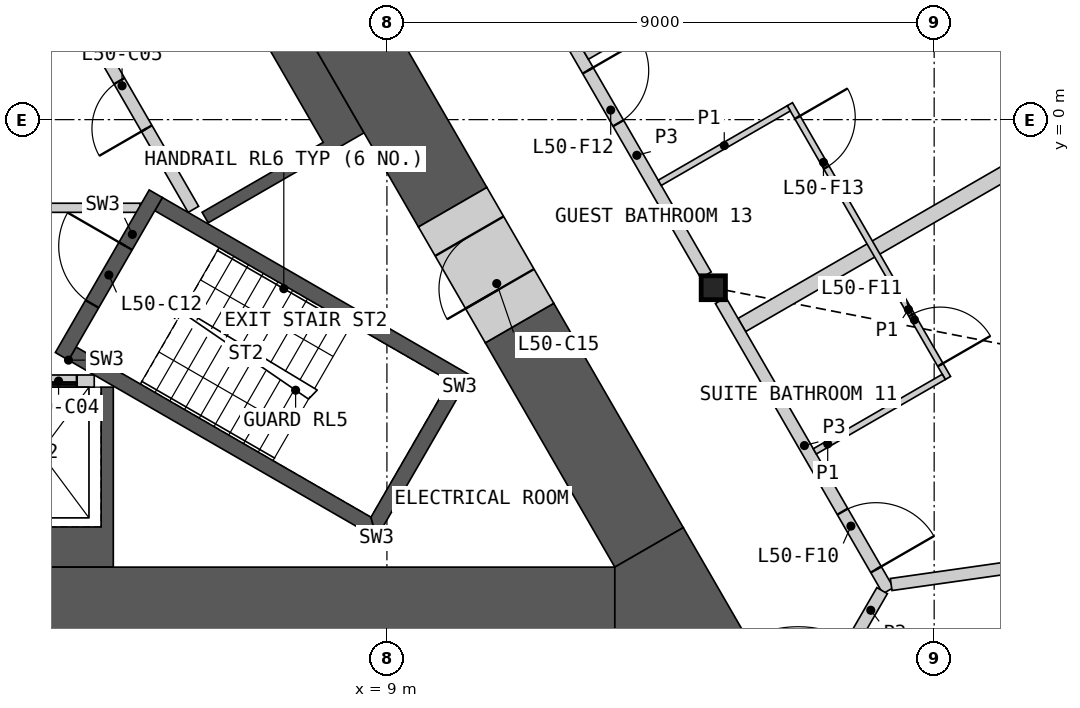
"""IFC4 building model, lengths in metres.
Left out: names, types, materials, properties, quantities, classifications, styles, units other than length and angle.
Written with IfcOpenShell. Run it as: python <this file> out.ifc"""

import sys

from ifc_helpers import new_model, si_unit, direction, frame, frame_2d, origin, origin_2d, place, context, subcontext, project, spatial, polyline, rectangle, i_section, outline, extrude, element, fill, save


model = new_model("IFC4")
c1 = context("Model", 3, precision=1e-05, world=origin(), true_north=direction((0.0, 1.0)))
c2 = subcontext(c1, "Body", "Model", "MODEL_VIEW")
j1 = project(units=[si_unit("LENGTHUNIT", "METRE"), si_unit("PLANEANGLEUNIT", "RADIAN")], contexts=[c1])
p1 = place(None, origin())
s1 = spatial("IfcSite", under=j1, at=p1, CompositionType="ELEMENT")
p2 = place(p1, origin())
s2 = spatial("IfcBuilding", under=s1, at=p2, CompositionType="ELEMENT")
p3 = place(p2, frame((0.0, 0.0, 231.0)))
s3 = spatial("IfcBuildingStorey", under=s2, at=p3, CompositionType="ELEMENT", Elevation=231.0)
p4 = place(p3, frame((14.368, -2.765, 0.0), z_axis=(0.0, 0.0, 1.0), x_axis=(1.0, 0.0, 0.0)))
e1 = element("IfcColumn", 1, at=p4, inside=s3, PredefinedType="COLUMN", context=c2, shape_type="SweptSolid", body=[
    extrude(i_section(OverallWidth=0.399, OverallDepth=0.393, WebThickness=0.023, FlangeThickness=0.037, at=origin_2d()), origin(), (0.0, 0.0, 1.0), 3.6),
])
p5 = place(p3, origin())
e2 = element("IfcWall", 2, at=p5, inside=s3, PredefinedType="SHEAR", context=c2, shape_type="SweptSolid", body=[
    extrude(outline(polyline([(2.1, -7.36), (2.1, -4.4), (2.3, -4.4), (2.3, -6.7), (4.3, -6.7), (4.3, -4.4), (4.5, -4.4), (4.5, -7.36), (2.1, -7.36)])), origin(), (0.0, 0.0, 1.0), 3.25),
])
p6 = place(p3, frame((-4.187, -4.3, 0.0), z_axis=(0.0, 0.0, 1.0), x_axis=(1.0, 0.0, 0.0)))
e3 = element("IfcWall", 3, at=p6, inside=s3, PredefinedType="SOLIDWALL", context=c2, shape_type="SweptSolid", body=[
    extrude(rectangle(XDim=8.373, YDim=0.2, at=frame_2d((4.187, 0.0))), origin(), (0.0, 0.0, 1.0), 3.25),
])
p7 = place(p6, frame((0.287, 0.0, 0.0)))
e4 = element("IfcOpeningElement", 4, at=p7, cuts=e3, PredefinedType="OPENING", context=c2, shape_type="SweptSolid", body=[
    extrude(rectangle(XDim=1.2, YDim=2.1, at=frame_2d((0.6, 1.05))), frame((0.0, 0.11, 0.0), z_axis=(0.0, -1.0, 0.0), x_axis=(1.0, 0.0, 0.0)), (0.0, 0.0, 1.0), 0.22),
])
p8 = place(p6, frame((2.387, 0.0, 0.0)))
e5 = element("IfcOpeningElement", 5, at=p8, cuts=e3, PredefinedType="OPENING", context=c2, shape_type="SweptSolid", body=[
    extrude(rectangle(XDim=1.4, YDim=2.1, at=frame_2d((0.7, 1.05))), frame((0.0, 0.11, 0.0), z_axis=(0.0, -1.0, 0.0), x_axis=(1.0, 0.0, 0.0)), (0.0, 0.0, 1.0), 0.22),
])
p9 = place(p6, frame((4.837, 0.0, 0.0)))
e6 = element("IfcOpeningElement", 6, at=p9, cuts=e3, PredefinedType="OPENING", context=c2, shape_type="SweptSolid", body=[
    extrude(rectangle(XDim=0.9, YDim=2.1, at=frame_2d((0.45, 1.05))), frame((0.0, 0.11, 0.0), z_axis=(0.0, -1.0, 0.0), x_axis=(1.0, 0.0, 0.0)), (0.0, 0.0, 1.0), 0.22),
])
p10 = place(p6, frame((6.887, 0.0, 0.0)))
e7 = element("IfcOpeningElement", 7, at=p10, cuts=e3, PredefinedType="OPENING", context=c2, shape_type="SweptSolid", body=[
    extrude(rectangle(XDim=1.2, YDim=2.1, at=frame_2d((0.6, 1.05))), frame((0.0, 0.11, 0.0), z_axis=(0.0, -1.0, 0.0), x_axis=(1.0, 0.0, 0.0)), (0.0, 0.0, 1.0), 0.22),
])
p11 = place(p3, origin())
e8 = element("IfcWall", 8, at=p11, inside=s3, PredefinedType="SHEAR", context=c2, shape_type="SweptSolid", body=[
    extrude(outline(polyline([(6.324, 3.767), (8.624, -0.217), (8.231, -0.444), (6.061, -1.697), (5.96, -1.524), (7.952, -0.374), (5.852, 3.263), (3.861, 2.113), (3.76, 2.287), (5.931, 3.54), (6.324, 3.767)])), origin(), (0.0, 0.0, 1.0), 3.25),
])
p12 = place(p3, frame((5.817, -1.476, 0.0), z_axis=(0.0, 0.0, 1.0), x_axis=(-0.500002616675, 0.866023893041, 0.0)))
e9 = element("IfcWall", 9, at=p12, inside=s3, PredefinedType="SOLIDWALL", context=c2, shape_type="SweptSolid", body=[
    extrude(rectangle(XDim=8.373, YDim=0.2, at=frame_2d((4.187, 0.0))), origin(), (0.0, 0.0, 1.0), 3.25),
])
p13 = place(p12, frame((1.537, 0.0, 0.0)))
e10 = element("IfcOpeningElement", 10, at=p13, cuts=e9, PredefinedType="OPENING", context=c2, shape_type="SweptSolid", body=[
    extrude(rectangle(XDim=0.9, YDim=2.1, at=frame_2d((0.45, 1.05))), frame((0.0, 0.11, 0.0), z_axis=(0.0, -1.0, 0.0), x_axis=(1.0, 0.0, 0.0)), (0.0, 0.0, 1.0), 0.22),
])
p14 = place(p12, frame((4.837, 0.0, 0.0)))
e11 = element("IfcOpeningElement", 11, at=p14, cuts=e9, PredefinedType="OPENING", context=c2, shape_type="SweptSolid", body=[
    extrude(rectangle(XDim=0.9, YDim=2.1, at=frame_2d((0.45, 1.05))), frame((0.0, 0.11, 0.0), z_axis=(0.0, -1.0, 0.0), x_axis=(1.0, 0.0, 0.0)), (0.0, 0.0, 1.0), 0.22),
])
p15 = place(p12, frame((6.937, 0.0, 0.0)))
e12 = element("IfcOpeningElement", 12, at=p15, cuts=e9, PredefinedType="OPENING", context=c2, shape_type="SweptSolid", body=[
    extrude(rectangle(XDim=1.1, YDim=2.1, at=frame_2d((0.55, 1.05))), frame((0.0, 0.11, 0.0), z_axis=(0.0, -1.0, 0.0), x_axis=(1.0, 0.0, 0.0)), (0.0, 0.0, 1.0), 0.22),
])
p16 = place(p3, frame((-4.941, -1.45, 0.0), z_axis=(0.0, 0.0, 1.0), x_axis=(1.0, 0.0, 0.0)))
e13 = element("IfcWall", 13, at=p16, inside=s3, PredefinedType="PARTITIONING", context=c2, shape_type="SweptSolid", body=[
    extrude(rectangle(XDim=9.882, YDim=0.15, at=frame_2d((4.941, 0.0))), origin(), (0.0, 0.0, 1.0), 3.25),
])
p17 = place(p16, frame((4.391, 0.0, 0.0)))
e14 = element("IfcOpeningElement", 14, at=p17, cuts=e13, PredefinedType="OPENING", context=c2, shape_type="SweptSolid", body=[
    extrude(rectangle(XDim=1.1, YDim=2.1, at=frame_2d((0.55, 1.05))), frame((0.0, 0.085, 0.0), z_axis=(0.0, -1.0, 0.0), x_axis=(1.0, 0.0, 0.0)), (0.0, 0.0, 1.0), 0.17),
])
p18 = place(p3, origin())
e15 = element("IfcWall", 15, at=p18, inside=s3, PredefinedType="SHEAR", context=c2, shape_type="SweptSolid", body=[
    extrude(outline(polyline([(3.763, -3.956), (8.83, -6.881), (8.738, -6.539), (3.888, -3.739), (3.763, -3.956)])), origin(), (0.0, 0.0, 1.0), 3.25),
])
p19 = place(p3, origin())
e16 = element("IfcWall", 16, at=p19, inside=s3, PredefinedType="SHEAR", context=c2, shape_type="SweptSolid", body=[
    extrude(outline(polyline([(8.83, -6.881), (10.374, -4.206), (10.032, -4.298), (8.738, -6.539), (8.83, -6.881)])), origin(), (0.0, 0.0, 1.0), 3.25),
])
p20 = place(p3, origin())
e17 = element("IfcWall", 17, at=p20, inside=s3, PredefinedType="SHEAR", context=c2, shape_type="SweptSolid", body=[
    extrude(outline(polyline([(10.032, -4.298), (10.374, -4.206), (5.307, -1.281), (5.182, -1.498), (10.032, -4.298)])), origin(), (0.0, 0.0, 1.0), 3.25),
])
p21 = place(p3, frame((3.655, -3.893, 0.0), z_axis=(0.0, 0.0, 1.0), x_axis=(0.499982516597, 0.866035497597, 0.0)))
e18 = element("IfcWall", 18, at=p21, inside=s3, PredefinedType="SHEAR", context=c2, shape_type="SweptSolid", body=[
    extrude(rectangle(XDim=3.088, YDim=0.25, at=frame_2d((1.544, 0.0))), origin(), (0.0, 0.0, 1.0), 3.25),
])
p22 = place(p21, frame((0.994, 0.0, 0.0)))
e19 = element("IfcOpeningElement", 19, at=p22, cuts=e18, PredefinedType="OPENING", context=c2, shape_type="SweptSolid", body=[
    extrude(rectangle(XDim=1.1, YDim=2.1, at=frame_2d((0.55, 1.05))), frame((0.0, 0.135, 0.0), z_axis=(0.0, -1.0, 0.0), x_axis=(1.0, 0.0, 0.0)), (0.0, 0.0, 1.0), 0.27),
])
p23 = place(p3, frame((-12.748, -8.01, 0.0), z_axis=(0.0, 0.0, 1.0), x_axis=(1.0, 0.0, 0.0)))
e20 = element("IfcWall", 20, at=p23, inside=s3, PredefinedType="SHEAR", context=c2, shape_type="SweptSolid", body=[
    extrude(rectangle(XDim=25.497, YDim=1.3, at=frame_2d((12.748, 0.0))), origin(), (0.0, 0.0, 1.0), 3.25),
])
p24 = place(p3, frame((10.081, -1.441, 0.0), z_axis=(0.0, 0.0, 1.0), x_axis=(-0.500012180433, 0.866018371294, 0.0)))
e21 = element("IfcWall", 21, at=p24, inside=s3, PredefinedType="SHEAR", context=c2, shape_type="SweptSolid", body=[
    extrude(rectangle(XDim=15.05, YDim=1.3, at=frame_2d((7.525, 0.0))), origin(), (0.0, 0.0, 1.0), 3.25),
])
p25 = place(p3, frame((13.311, -7.035, 0.0), z_axis=(0.0, 0.0, 1.0), x_axis=(-0.500003555838, 0.866023350811, 0.0)))
e22 = element("IfcWall", 22, at=p25, inside=s3, PredefinedType="SHEAR", context=c2, shape_type="SweptSolid", body=[
    extrude(rectangle(XDim=4.26, YDim=1.3, at=frame_2d((2.13, 0.0))), origin(), (0.0, 0.0, 1.0), 3.25),
])
p26 = place(p3, origin())
e23 = element("IfcWall", 23, at=p26, inside=s3, PredefinedType="SHEAR", context=c2, shape_type="SweptSolid", body=[
    extrude(outline(polyline([(12.748, -8.66), (12.748, -7.36), (13.874, -6.71), (15.0, -8.66), (12.748, -8.66)])), origin(), (0.0, 0.0, 1.0), 3.25),
])
p27 = place(p3, frame((11.181, -3.346, 0.0), z_axis=(0.0, 0.0, 1.0), x_axis=(-0.499946605688, 0.86605622881, 0.0)))
e24 = element("IfcWall", 24, at=p27, inside=s3, PredefinedType="SHEAR", context=c2, shape_type="SweptSolid", body=[
    extrude(rectangle(XDim=2.2, YDim=1.3, at=frame_2d((1.1, 0.0))), origin(), (0.0, 0.0, 1.0), 3.25),
])
p28 = place(p27, frame((0.65, 0.0, 0.0)))
e25 = element("IfcOpeningElement", 25, at=p28, cuts=e24, PredefinedType="OPENING", context=c2, shape_type="SweptSolid", body=[
    extrude(rectangle(XDim=1.0, YDim=2.1, at=frame_2d((0.5, 1.05))), frame((0.0, 0.66, 0.0), z_axis=(0.0, -1.0, 0.0), x_axis=(1.0, 0.0, 0.0)), (0.0, 0.0, 1.0), 1.32),
])
p29 = place(p3, frame((14.837, -3.378, 0.0), z_axis=(0.0, 0.0, 1.0), x_axis=(0.866021706022, 0.500006404657, 0.0)))
e26 = element("IfcWall", 26, at=p29, inside=s3, PredefinedType="PARTITIONING", context=c2, shape_type="SweptSolid", body=[
    extrude(rectangle(XDim=12.33, YDim=0.25, at=frame_2d((6.165, 0.0))), origin(), (0.0, 0.0, 1.0), 2.404),
])
p30 = place(p3, frame((9.699, 5.321, 0.0), z_axis=(0.0, 0.0, 1.0), x_axis=(0.49998193945, -0.866035830797, 0.0)))
e27 = element("IfcWall", 27, at=p30, inside=s3, PredefinedType="PARTITIONING", context=c2, shape_type="SweptSolid", body=[
    extrude(rectangle(XDim=9.094, YDim=0.2, at=frame_2d((4.547, 0.0))), origin(), (0.0, 0.0, 1.0), 3.25),
])
p31 = place(p30, frame((5.212, 0.0, 0.0)))
e28 = element("IfcOpeningElement", 28, at=p31, cuts=e27, PredefinedType="OPENING", context=c2, shape_type="SweptSolid", body=[
    extrude(rectangle(XDim=1.0, YDim=2.1, at=frame_2d((0.5, 1.05))), frame((0.0, 0.11, 0.0), z_axis=(0.0, -1.0, 0.0), x_axis=(1.0, 0.0, 0.0)), (0.0, 0.0, 1.0), 0.22),
])
p32 = place(p30, frame((1.162, 0.0, 0.0)))
e29 = element("IfcOpeningElement", 29, at=p32, cuts=e27, PredefinedType="OPENING", context=c2, shape_type="SweptSolid", body=[
    extrude(rectangle(XDim=1.1, YDim=2.1, at=frame_2d((0.55, 1.05))), frame((0.0, 0.11, 0.0), z_axis=(0.0, -1.0, 0.0), x_axis=(1.0, 0.0, 0.0)), (0.0, 0.0, 1.0), 0.22),
])
p33 = place(p3, frame((12.251, 1.101, 0.0), z_axis=(0.0, 0.0, 1.0), x_axis=(0.866020808234, 0.500007959642, 0.0)))
e30 = element("IfcWall", 30, at=p33, inside=s3, PredefinedType="PARTITIONING", context=c2, shape_type="SweptSolid", body=[
    extrude(rectangle(XDim=7.649, YDim=0.25, at=frame_2d((3.824, 0.0))), origin(), (0.0, 0.0, 1.0), 2.404),
])
p34 = place(p3, frame((14.489, -2.975, 0.0), z_axis=(0.0, 0.0, 1.0), x_axis=(0.500017753321, -0.866015153657, 0.0)))
e31 = element("IfcWall", 31, at=p34, inside=s3, PredefinedType="PARTITIONING", context=c2, shape_type="SweptSolid", body=[
    extrude(rectangle(XDim=5.51, YDim=0.2, at=frame_2d((2.755, 0.0))), origin(), (0.0, 0.0, 1.0), 3.25),
])
p35 = place(p34, frame((4.01, 0.0, 0.0)))
e32 = element("IfcOpeningElement", 32, at=p35, cuts=e31, PredefinedType="OPENING", context=c2, shape_type="SweptSolid", body=[
    extrude(rectangle(XDim=1.1, YDim=2.1, at=frame_2d((0.55, 1.05))), frame((0.0, 0.11, 0.0), z_axis=(0.0, -1.0, 0.0), x_axis=(1.0, 0.0, 0.0)), (0.0, 0.0, 1.0), 0.22),
])
p36 = place(p3, frame((15.281, -10.974, 0.0), z_axis=(0.0, 0.0, 1.0), x_axis=(0.499958791762, 0.866049194065, 0.0)))
e33 = element("IfcWall", 33, at=p36, inside=s3, PredefinedType="PARTITIONING", context=c2, shape_type="SweptSolid", body=[
    extrude(rectangle(XDim=3.726, YDim=0.2, at=frame_2d((1.863, 0.0))), origin(), (0.0, 0.0, 1.0), 3.25),
])
p37 = place(p36, frame((0.963, 0.0, 0.0)))
e34 = element("IfcOpeningElement", 34, at=p37, cuts=e33, PredefinedType="OPENING", context=c2, shape_type="SweptSolid", body=[
    extrude(rectangle(XDim=1.8, YDim=2.1, at=frame_2d((0.9, 1.05))), frame((0.0, 0.11, 0.0), z_axis=(0.0, -1.0, 0.0), x_axis=(1.0, 0.0, 0.0)), (0.0, 0.0, 1.0), 0.22),
])
p38 = place(p3, frame((17.293, -7.646, 0.0), z_axis=(0.0, 0.0, 1.0), x_axis=(0.990042285303, 0.140770285614, 0.0)))
e35 = element("IfcWall", 35, at=p38, inside=s3, PredefinedType="PARTITIONING", context=c2, shape_type="SweptSolid", body=[
    extrude(rectangle(XDim=13.545, YDim=0.2, at=frame_2d((6.772, 0.0))), origin(), (0.0, 0.0, 1.0), 2.404),
])
p39 = place(p3, frame((15.627, 0.254, 0.0), z_axis=(0.0, 0.0, 1.0), x_axis=(0.500027264788, -0.866009661879, 0.0)))
e36 = element("IfcWall", 36, at=p39, inside=s3, PredefinedType="PARTITIONING", context=c2, shape_type="SweptSolid", body=[
    extrude(rectangle(XDim=5.2, YDim=0.1, at=frame_2d((2.6, 0.0))), origin(), (0.0, 0.0, 1.0), 2.404),
])
p40 = place(p39, frame((4.0, 0.0, 0.0)))
e37 = element("IfcOpeningElement", 37, at=p40, cuts=e36, PredefinedType="OPENING", context=c2, shape_type="SweptSolid", body=[
    extrude(rectangle(XDim=0.95, YDim=2.1, at=frame_2d((0.475, 1.05))), frame((0.0, 0.06, 0.0), z_axis=(0.0, -1.0, 0.0), x_axis=(1.0, 0.0, 0.0)), (0.0, 0.0, 1.0), 0.12),
])
p41 = place(p39, frame((0.25, 0.0, 0.0)))
e38 = element("IfcOpeningElement", 38, at=p41, cuts=e36, PredefinedType="OPENING", context=c2, shape_type="SweptSolid", body=[
    extrude(rectangle(XDim=0.95, YDim=2.1, at=frame_2d((0.475, 1.05))), frame((0.0, 0.06, 0.0), z_axis=(0.0, -1.0, 0.0), x_axis=(1.0, 0.0, 0.0)), (0.0, 0.0, 1.0), 0.12),
])
p42 = place(p3, frame((16.037, -5.456, 0.0), z_axis=(0.0, 0.0, 1.0), x_axis=(0.865989751695, 0.500061746146, 0.0)))
e39 = element("IfcWall", 39, at=p42, inside=s3, PredefinedType="PARTITIONING", context=c2, shape_type="SweptSolid", body=[
    extrude(rectangle(XDim=2.45, YDim=0.1, at=frame_2d((1.225, 0.0))), origin(), (0.0, 0.0, 1.0), 2.404),
])
p43 = place(p3, frame((13.487, -1.04, 0.0), z_axis=(0.0, 0.0, 1.0), x_axis=(0.866032905446, 0.499987006516, 0.0)))
e40 = element("IfcWall", 40, at=p43, inside=s3, PredefinedType="PARTITIONING", context=c2, shape_type="SweptSolid", body=[
    extrude(rectangle(XDim=2.45, YDim=0.1, at=frame_2d((1.225, 0.0))), origin(), (0.0, 0.0, 1.0), 2.404),
])
p44 = place(p10, origin())
e41 = element("IfcDoor", 41, at=p44, inside=s3, OperationType="SLIDING_TO_LEFT", PredefinedType="DOOR", context=c2, shape_type="SweptSolid", body=[
    extrude(rectangle(XDim=1.2, YDim=2.1, at=frame_2d((0.6, 1.05))), frame((0.0, 0.025, 0.0), z_axis=(0.0, -1.0, 0.0), x_axis=(1.0, 0.0, 0.0)), (0.0, 0.0, 1.0), 0.05),
])
fill(e7, e41)
p45 = place(p13, origin())
e42 = element("IfcDoor", 42, at=p45, inside=s3, OperationType="SINGLE_SWING_LEFT", PredefinedType="DOOR", context=c2, shape_type="SweptSolid", body=[
    extrude(rectangle(XDim=0.9, YDim=2.1, at=frame_2d((0.45, 1.05))), frame((0.0, 0.025, 0.0), z_axis=(0.0, -1.0, 0.0), x_axis=(1.0, 0.0, 0.0)), (0.0, 0.0, 1.0), 0.05),
])
fill(e10, e42)
p46 = place(p22, origin())
e43 = element("IfcDoor", 43, at=p46, inside=s3, OperationType="SINGLE_SWING_RIGHT", PredefinedType="DOOR", context=c2, shape_type="SweptSolid", body=[
    extrude(rectangle(XDim=1.1, YDim=2.1, at=frame_2d((0.55, 1.05))), frame((0.0, 0.025, 0.0), z_axis=(0.0, -1.0, 0.0), x_axis=(1.0, 0.0, 0.0)), (0.0, 0.0, 1.0), 0.05),
])
fill(e19, e43)
p47 = place(p28, origin())
e44 = element("IfcDoor", 44, at=p47, inside=s3, OperationType="SINGLE_SWING_LEFT", PredefinedType="DOOR", context=c2, shape_type="SweptSolid", body=[
    extrude(rectangle(XDim=1.0, YDim=2.1, at=frame_2d((0.5, 1.05))), frame((0.0, 0.405, 0.0), z_axis=(0.0, -1.0, 0.0), x_axis=(1.0, 0.0, 0.0)), (0.0, 0.0, 1.0), 0.05),
])
fill(e25, e44)
p48 = place(p35, origin())
e45 = element("IfcDoor", 45, at=p48, inside=s3, OperationType="SINGLE_SWING_RIGHT", PredefinedType="DOOR", context=c2, shape_type="SweptSolid", body=[
    extrude(rectangle(XDim=1.1, YDim=2.1, at=frame_2d((0.55, 1.05))), frame((0.0, 0.025, 0.0), z_axis=(0.0, -1.0, 0.0), x_axis=(1.0, 0.0, 0.0)), (0.0, 0.0, 1.0), 0.05),
])
fill(e32, e45)
p49 = place(p40, origin())
e46 = element("IfcDoor", 46, at=p49, inside=s3, OperationType="SINGLE_SWING_RIGHT", PredefinedType="DOOR", context=c2, shape_type="SweptSolid", body=[
    extrude(rectangle(XDim=0.95, YDim=2.1, at=frame_2d((0.475, 1.05))), frame((0.0, 0.025, 0.0), z_axis=(0.0, -1.0, 0.0), x_axis=(1.0, 0.0, 0.0)), (0.0, 0.0, 1.0), 0.05),
])
fill(e37, e46)
p50 = place(p31, origin())
e47 = element("IfcDoor", 47, at=p50, inside=s3, OperationType="SINGLE_SWING_LEFT", PredefinedType="DOOR", context=c2, shape_type="SweptSolid", body=[
    extrude(rectangle(XDim=1.0, YDim=2.1, at=frame_2d((0.5, 1.05))), frame((0.0, 0.025, 0.0), z_axis=(0.0, -1.0, 0.0), x_axis=(1.0, 0.0, 0.0)), (0.0, 0.0, 1.0), 0.05),
])
fill(e28, e47)
p51 = place(p41, origin())
e48 = element("IfcDoor", 48, at=p51, inside=s3, OperationType="SINGLE_SWING_LEFT", PredefinedType="DOOR", context=c2, shape_type="SweptSolid", body=[
    extrude(rectangle(XDim=0.95, YDim=2.1, at=frame_2d((0.475, 1.05))), frame((0.0, 0.025, 0.0), z_axis=(0.0, -1.0, 0.0), x_axis=(1.0, 0.0, 0.0)), (0.0, 0.0, 1.0), 0.05),
])
fill(e38, e48)
save(model, sys.argv[1])
